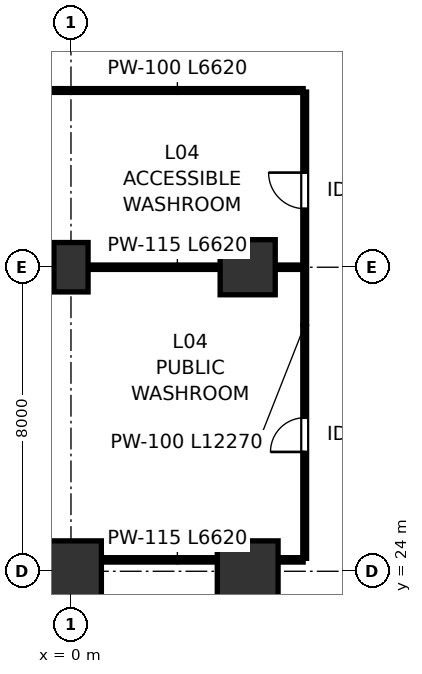
"""IFC4 building model, lengths in metres.
Left out: names, types, materials, properties, quantities, classifications, styles, units other than length and angle.
Written with IfcOpenShell. Run it as: python <this file> out.ifc"""

import sys

from ifc_helpers import new_model, si_unit, direction, frame, frame_2d, origin, origin_2d, place, context, subcontext, project, spatial, rectangle, extrude, source, transform, mapped, element, fill, save


model = new_model("IFC4")
c1 = context("Model", 3, precision=1e-05, world=origin(), true_north=direction((0.0, 1.0)))
c2 = subcontext(c1, "Body", "Model", "MODEL_VIEW")
j1 = project(units=[si_unit("LENGTHUNIT", "METRE"), si_unit("PLANEANGLEUNIT", "RADIAN")], contexts=[c1])
p1 = place(None, origin())
s1 = spatial("IfcSite", under=j1, at=p1, CompositionType="ELEMENT")
p2 = place(p1, origin())
s2 = spatial("IfcBuilding", under=s1, at=p2, CompositionType="ELEMENT")
p3 = place(p2, frame((0.0, 0.0, 17.4)))
s3 = spatial("IfcBuildingStorey", under=s2, at=p3, CompositionType="ELEMENT", Elevation=17.4)
m1 = source(origin(), c2, "Body", "SweptSolid", [
    extrude(rectangle(XDim=1.6, YDim=1.6, at=origin_2d()), origin(), (0.0, 0.0, 1.0), 4.799),
])
p4 = place(p3, frame((0.0, 24.0, 0.001), z_axis=(0.0, 0.0, 1.0), x_axis=(1.0, 0.0, 0.0)))
e1 = element("IfcColumn", 1, at=p4, inside=s3, PredefinedType="COLUMN", context=c2, shape_type="MappedRepresentation", body=[
    mapped(m1, transform((0.0, 0.0, 0.0), scale=1.0)),
])
m2 = source(origin(), c2, "Body", "SweptSolid", [
    extrude(rectangle(XDim=0.9, YDim=1.3, at=origin_2d()), origin(), (0.0, 0.0, 1.0), 4.799),
])
p5 = place(p3, frame((0.0, 32.0, 0.001), z_axis=(0.0, 0.0, 1.0), x_axis=(1.0, 0.0, 0.0)))
e2 = element("IfcColumn", 2, at=p5, inside=s3, PredefinedType="PILASTER", context=c2, shape_type="MappedRepresentation", body=[
    mapped(m2, transform((0.0, 0.0, 0.0), scale=1.0)),
])
p6 = place(p3, frame((4.65, 24.0, 0.001), z_axis=(0.0, 0.0, 1.0), x_axis=(1.0, 0.0, 0.0)))
e3 = element("IfcColumn", 3, at=p6, inside=s3, PredefinedType="COLUMN", context=c2, shape_type="MappedRepresentation", body=[
    mapped(m1, transform((0.0, 0.0, 0.0), scale=1.0)),
])
m3 = source(origin(), c2, "Body", "SweptSolid", [
    extrude(rectangle(XDim=1.45, YDim=1.45, at=origin_2d()), origin(), (0.0, 0.0, 1.0), 4.799),
])
p7 = place(p3, frame((4.65, 32.0, 0.001), z_axis=(0.0, 0.0, 1.0), x_axis=(1.0, 0.0, 0.0)))
e4 = element("IfcColumn", 4, at=p7, inside=s3, PredefinedType="COLUMN", context=c2, shape_type="MappedRepresentation", body=[
    mapped(m3, transform((0.0, 0.0, 0.0), scale=1.0)),
])
p8 = place(p3, frame((-0.51, 24.3, 0.0), z_axis=(0.0, 0.0, 1.0), x_axis=(1.0, 0.0, 0.0)))
e5 = element("IfcWall", 5, at=p8, inside=s3, PredefinedType="PARTITIONING", context=c2, shape_type="SweptSolid", body=[
    extrude(rectangle(XDim=6.62, YDim=0.115, at=frame_2d((3.31, 0.0))), origin(), (0.0, 0.0, 1.0), 3.67),
])
p9 = place(p3, frame((-0.51, 36.65, 0.0), z_axis=(0.0, 0.0, 1.0), x_axis=(1.0, 0.0, 0.0)))
e6 = element("IfcWall", 6, at=p9, inside=s3, PredefinedType="PARTITIONING", context=c2, shape_type="SweptSolid", body=[
    extrude(rectangle(XDim=6.62, YDim=0.1, at=frame_2d((3.31, 0.0))), origin(), (0.0, 0.0, 1.0), 3.675),
])
p10 = place(p3, frame((-0.51, 32.0, 0.0), z_axis=(0.0, 0.0, 1.0), x_axis=(1.0, 0.0, 0.0)))
e7 = element("IfcWall", 7, at=p10, inside=s3, PredefinedType="PARTITIONING", context=c2, shape_type="SweptSolid", body=[
    extrude(rectangle(XDim=6.62, YDim=0.115, at=frame_2d((3.31, 0.0))), origin(), (0.0, 0.0, 1.0), 3.675),
])
p11 = place(p3, frame((6.15, 24.34, 0.0), z_axis=(0.0, 0.0, 1.0), x_axis=(0.0, 1.0, 0.0)))
e8 = element("IfcWall", 8, at=p11, inside=s3, PredefinedType="PARTITIONING", context=c2, shape_type="SweptSolid", body=[
    extrude(rectangle(XDim=12.27, YDim=0.1, at=frame_2d((6.135, 0.0))), origin(), (0.0, 0.0, 1.0), 3.675),
])
p12 = place(p11, frame((2.8, 0.0, 0.0)))
e9 = element("IfcOpeningElement", 9, at=p12, cuts=e8, PredefinedType="OPENING", context=c2, shape_type="SweptSolid", body=[
    extrude(rectangle(XDim=0.9, YDim=2.15, at=frame_2d((0.45, 1.075))), frame((0.0, 0.06, 0.0), z_axis=(0.0, -1.0, 0.0), x_axis=(1.0, 0.0, 0.0)), (0.0, 0.0, 1.0), 0.12),
])
p13 = place(p11, frame((9.2, 0.0, 0.0)))
e10 = element("IfcOpeningElement", 10, at=p13, cuts=e8, PredefinedType="OPENING", context=c2, shape_type="SweptSolid", body=[
    extrude(rectangle(XDim=0.95, YDim=2.15, at=frame_2d((0.475, 1.075))), frame((0.0, 0.06, 0.0), z_axis=(0.0, -1.0, 0.0), x_axis=(1.0, 0.0, 0.0)), (0.0, 0.0, 1.0), 0.12),
])
m4 = source(origin(), c2, "Body", "SweptSolid", [
    extrude(rectangle(XDim=0.9, YDim=2.15, at=frame_2d((0.45, 1.075))), frame((0.0, 0.025, 0.0), z_axis=(0.0, -1.0, 0.0), x_axis=(1.0, 0.0, 0.0)), (0.0, 0.0, 1.0), 0.05),
])
p14 = place(p12, origin())
e11 = element("IfcDoor", 11, at=p14, inside=s3, OperationType="SINGLE_SWING_LEFT", PredefinedType="DOOR", context=c2, shape_type="MappedRepresentation", body=[
    mapped(m4, transform((0.0, 0.0, 0.0), scale=1.0)),
])
fill(e9, e11)
m5 = source(origin(), c2, "Body", "SweptSolid", [
    extrude(rectangle(XDim=0.95, YDim=2.15, at=frame_2d((0.475, 1.075))), frame((0.0, 0.025, 0.0), z_axis=(0.0, -1.0, 0.0), x_axis=(1.0, 0.0, 0.0)), (0.0, 0.0, 1.0), 0.05),
])
p15 = place(p13, origin())
e12 = element("IfcDoor", 12, at=p15, inside=s3, OperationType="SINGLE_SWING_RIGHT", PredefinedType="DOOR", context=c2, shape_type="MappedRepresentation", body=[
    mapped(m5, transform((0.0, 0.0, 0.0), scale=1.0)),
])
fill(e10, e12)
save(model, sys.argv[1])
